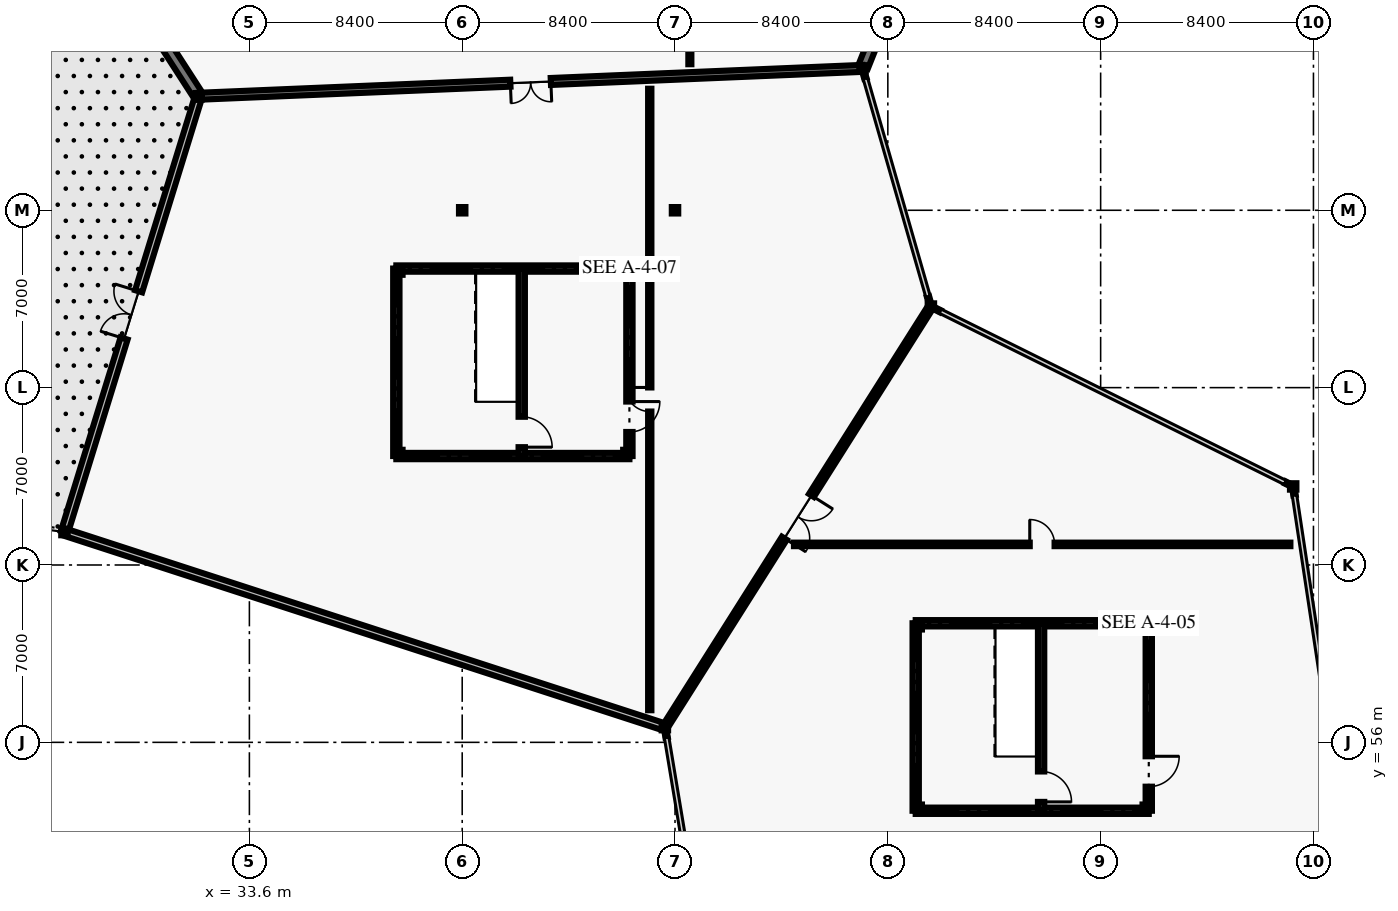
"""IFC4 building model, lengths in metres.
Left out: names, types, materials, properties, quantities, classifications, styles, units other than length and angle.
Written with IfcOpenShell. Run it as: python <this file> out.ifc"""

import sys

from ifc_helpers import new_model, si_unit, direction, frame, frame_2d, origin, origin_2d, place, context, subcontext, project, spatial, rectangle, i_section, extrude, element, fill, save


model = new_model("IFC4")
c1 = context("Model", 3, precision=1e-05, world=origin(), true_north=direction((0.0, 1.0)))
c2 = subcontext(c1, "Body", "Model", "MODEL_VIEW")
j1 = project(units=[si_unit("LENGTHUNIT", "METRE"), si_unit("PLANEANGLEUNIT", "RADIAN")], contexts=[c1])
p1 = place(None, origin())
s1 = spatial("IfcSite", under=j1, at=p1, CompositionType="ELEMENT")
p2 = place(p1, origin())
s2 = spatial("IfcBuilding", under=s1, at=p2, CompositionType="ELEMENT")
p3 = place(p2, frame((0.0, 0.0, 15.0)))
s3 = spatial("IfcBuildingStorey", under=s2, at=p3, CompositionType="ELEMENT", Elevation=15.0)
for number, where, z_axis, x_axis in (
    (1, (26.3, 64.3, 0.0), (0.0, 0.0, 1.0), (1.0, 0.0, 0.0)),
    (2, (31.6, 81.5, 0.0), (0.0, 0.0, 1.0), (1.0, 0.0, 0.0)),
    (3, (50.0, 56.6, 0.0), (0.0, 0.0, 1.0), (1.0, 0.0, 0.0)),
    (4, (57.8, 82.6, 0.0), (0.0, 0.0, 1.0), (1.0, 0.0, 0.0)),
    (5, (60.5, 73.2, 0.0), (0.0, 0.0, 1.0), (1.0, 0.0, 0.0)),
    (6, (74.8, 66.1, 0.0), (0.0, 0.0, 1.0), (1.0, 0.0, 0.0)),
    (7, (42.0, 77.0, 0.0), (0.0, 0.0, 1.0), (1.0, 0.0, 0.0)),
    (8, (50.4, 77.0, 0.0), (0.0, 0.0, 1.0), (1.0, 0.0, 0.0)),
    (9, (60.02, 53.42, 0.0), (0.0, 0.0, 1.0), (1.0, 0.0, 0.0)),
    (10, (68.98, 53.42, 0.0), (0.0, 0.0, 1.0), (1.0, 0.0, 0.0)),
    (11, (68.98, 60.58, 0.0), (0.0, 0.0, 1.0), (1.0, 0.0, 0.0)),
    (12, (60.02, 60.58, 0.0), (0.0, 0.0, 1.0), (1.0, 0.0, 0.0)),
    (13, (39.52, 67.42, 0.0), (0.0, 0.0, 1.0), (1.0, 0.0, 0.0)),
    (14, (48.48, 67.42, 0.0), (0.0, 0.0, 1.0), (1.0, 0.0, 0.0)),
    (15, (48.48, 74.58, 0.0), (0.0, 0.0, 1.0), (1.0, 0.0, 0.0)),
    (16, (39.52, 74.58, 0.0), (0.0, 0.0, 1.0), (1.0, 0.0, 0.0)),
):
    element("IfcColumn", number, at=place(p3, frame(where, z_axis=z_axis, x_axis=x_axis)), inside=s3, PredefinedType="COLUMN", context=c2, shape_type="SweptSolid", body=[
        extrude(i_section(OverallWidth=0.254, OverallDepth=0.254, WebThickness=0.009, FlangeThickness=0.014, FilletRadius=0.013, at=origin_2d()), origin(), (0.0, 0.0, 1.0), 4.8),
    ])
p4 = place(p3, frame((50.068, 56.196, 0.0), z_axis=(0.0, 0.0, 1.0), x_axis=(-0.165554954509, 0.986200566334, 0.0)))
e17 = element("IfcWall", 17, at=p4, inside=s3, PredefinedType="SOLIDWALL", context=c2, shape_type="SweptSolid", body=[
    extrude(rectangle(XDim=0.308, YDim=0.095, at=frame_2d((0.154, 0.0))), origin(), (0.0, 0.0, 1.0), 3.62),
])
p5 = place(p3, frame((74.806, 66.058, 0.0), z_axis=(0.0, 0.0, 1.0), x_axis=(0.14996991646, -0.988690560366, 0.0)))
e18 = element("IfcWall", 18, at=p5, inside=s3, PredefinedType="SOLIDWALL", context=c2, shape_type="SweptSolid", body=[
    extrude(rectangle(XDim=0.308, YDim=0.095, at=frame_2d((0.154, 0.0))), origin(), (0.0, 0.0, 1.0), 3.62),
])
for number, where, z_axis, x_axis in (
    (19, (60.592, 73.154, 0.0), (0.0, 0.0, 1.0), (0.895, -0.446, 0.0)),
    (20, (74.487, 66.256, 0.0), (0.0, 0.0, 1.0), (0.895, -0.447, 0.0)),
):
    element("IfcWall", number, at=place(p3, frame(where, z_axis=z_axis, x_axis=x_axis)), inside=s3, PredefinedType="SOLIDWALL", context=c2, shape_type="SweptSolid", body=[
        extrude(rectangle(XDim=0.307, YDim=0.095, at=frame_2d((0.154, 0.0))), origin(), (0.0, 0.0, 1.0), 3.62),
    ])
for number, where, z_axis, x_axis in (
    (21, (57.829, 82.502, 0.0), (0.0, 0.0, 1.0), (0.276, -0.961, 0.0)),
    (22, (60.386, 73.594, 0.0), (0.0, 0.0, 1.0), (0.276, -0.961, 0.0)),
):
    element("IfcWall", number, at=place(p3, frame(where, z_axis=z_axis, x_axis=x_axis)), inside=s3, PredefinedType="SOLIDWALL", context=c2, shape_type="SweptSolid", body=[
        extrude(rectangle(XDim=0.308, YDim=0.095, at=frame_2d((0.154, 0.0))), origin(), (0.0, 0.0, 1.0), 3.62),
    ])
p6 = place(p3, frame((26.3, 64.3, 0.0), z_axis=(0.0, 0.0, 1.0), x_axis=(0.294452119874, 0.955666233108, 0.0)))
e23 = element("IfcWall", 23, at=p6, inside=s3, PredefinedType="SOLIDWALL", context=c2, shape_type="SweptSolid", body=[
    extrude(rectangle(XDim=17.938, YDim=0.29, at=frame_2d((8.969, 0.0))), origin(), (0.0, 0.0, 1.0), 3.62),
])
p7 = place(p6, frame((7.994, 0.0, 0.0)))
e24 = element("IfcOpeningElement", 24, at=p7, cuts=e23, PredefinedType="OPENING", context=c2, shape_type="SweptSolid", body=[
    extrude(rectangle(XDim=1.95, YDim=2.3, at=frame_2d((0.975, 1.15))), frame((0.0, 0.155, 0.0), z_axis=(0.0, -1.0, 0.0), x_axis=(1.0, 0.0, 0.0)), (0.0, 0.0, 1.0), 0.31),
])
p8 = place(p3, frame((49.943, 56.619, 0.0), z_axis=(0.0, 0.0, 1.0), x_axis=(-0.951067694824, 0.308982588283, 0.0)))
e25 = element("IfcWall", 25, at=p8, inside=s3, PredefinedType="SOLIDWALL", context=c2, shape_type="SweptSolid", body=[
    extrude(rectangle(XDim=24.86, YDim=0.29, at=frame_2d((12.43, 0.0))), origin(), (0.0, 0.0, 1.0), 3.62),
])
p9 = place(p3, frame((62.4, 94.1, 0.0), z_axis=(0.0, 0.0, 1.0), x_axis=(-0.371407751599, -0.928469860605, 0.0)))
e26 = element("IfcWall", 26, at=p9, inside=s3, PredefinedType="SOLIDWALL", context=c2, shape_type="SweptSolid", body=[
    extrude(rectangle(XDim=12.326, YDim=0.4, at=frame_2d((6.163, 0.0))), origin(), (0.0, 0.0, 1.0), 3.62),
])
p10 = place(p3, frame((31.567, 81.55, 0.0), z_axis=(0.0, 0.0, 1.0), x_axis=(-0.542653962992, 0.839956353895, 0.0)))
e27 = element("IfcWall", 27, at=p10, inside=s3, PredefinedType="SOLIDWALL", context=c2, shape_type="SweptSolid", body=[
    extrude(rectangle(XDim=7.679, YDim=0.4, at=frame_2d((3.839, 0.0))), origin(), (0.0, 0.0, 1.0), 3.62),
])
p11 = place(p3, frame((60.5, 73.2, 0.0), z_axis=(0.0, 0.0, 1.0), x_axis=(-0.534570878454, -0.845123645338, 0.0)))
e28 = element("IfcWall", 28, at=p11, inside=s3, PredefinedType="SOLIDWALL", context=c2, shape_type="SweptSolid", body=[
    extrude(rectangle(XDim=19.642, YDim=0.225, at=frame_2d((9.821, 0.0))), origin(), (0.0, 0.0, 1.0), 4.02),
])
p12 = place(p11, frame((8.821, 0.0, 0.0)))
e29 = element("IfcOpeningElement", 29, at=p12, cuts=e28, PredefinedType="OPENING", context=c2, shape_type="SweptSolid", body=[
    extrude(rectangle(XDim=2.0, YDim=2.5, at=frame_2d((1.0, 1.25))), frame((0.0, 0.123, 0.0), z_axis=(0.0, -1.0, 0.0), x_axis=(1.0, 0.0, 0.0)), (0.0, 0.0, 1.0), 0.245),
])
p13 = place(p3, frame((57.8, 82.6, 0.0), z_axis=(0.0, 0.0, 1.0), x_axis=(-0.999119645224, -0.041951573605, 0.0)))
e30 = element("IfcWall", 30, at=p13, inside=s3, PredefinedType="SOLIDWALL", context=c2, shape_type="SweptSolid", body=[
    extrude(rectangle(XDim=26.223, YDim=0.275, at=frame_2d((13.112, 0.0))), origin(), (0.0, 0.0, 1.0), 4.02),
])
p14 = place(p13, frame((12.312, 0.0, 0.0)))
e31 = element("IfcOpeningElement", 31, at=p14, cuts=e30, PredefinedType="OPENING", context=c2, shape_type="SweptSolid", body=[
    extrude(rectangle(XDim=1.6, YDim=2.45, at=frame_2d((0.8, 1.225))), frame((0.0, 0.147, 0.0), z_axis=(0.0, -1.0, 0.0), x_axis=(1.0, 0.0, 0.0)), (0.0, 0.0, 1.0), 0.295),
])
p15 = place(p3, frame((55.095, 63.813, 0.0), z_axis=(0.0, 0.0, 1.0), x_axis=(1.0, 0.0, 0.0)))
e32 = element("IfcWall", 32, at=p15, inside=s3, PredefinedType="PARTITIONING", context=c2, shape_type="SweptSolid", body=[
    extrude(rectangle(XDim=19.595, YDim=0.14, at=frame_2d((9.797, 0.0))), origin(), (0.0, 0.0, 1.0), 3.32),
])
p16 = place(p15, frame((9.307, 0.0, 0.0)))
e33 = element("IfcOpeningElement", 33, at=p16, cuts=e32, PredefinedType="OPENING", context=c2, shape_type="SweptSolid", body=[
    extrude(rectangle(XDim=0.98, YDim=2.15, at=frame_2d((0.49, 1.075))), frame((0.0, 0.08, 0.0), z_axis=(0.0, -1.0, 0.0), x_axis=(1.0, 0.0, 0.0)), (0.0, 0.0, 1.0), 0.16),
])
p17 = place(p3, frame((49.403, 57.267, 0.0), z_axis=(0.0, 0.0, 1.0), x_axis=(0.0, 1.0, 0.0)))
e34 = element("IfcWall", 34, at=p17, inside=s3, PredefinedType="PARTITIONING", context=c2, shape_type="SweptSolid", body=[
    extrude(rectangle(XDim=24.53, YDim=0.13, at=frame_2d((12.265, 0.0))), origin(), (0.0, 0.0, 1.0), 3.32),
])
p18 = place(p17, frame((11.79, 0.0, 0.0)))
e35 = element("IfcOpeningElement", 35, at=p18, cuts=e34, PredefinedType="OPENING", context=c2, shape_type="SweptSolid", body=[
    extrude(rectangle(XDim=0.95, YDim=2.15, at=frame_2d((0.475, 1.075))), frame((0.0, 0.075, 0.0), z_axis=(0.0, -1.0, 0.0), x_axis=(1.0, 0.0, 0.0)), (0.0, 0.0, 1.0), 0.15),
])
p19 = place(p3, frame((50.986, 82.764, 0.0), z_axis=(0.0, 0.0, 1.0), x_axis=(0.0, 1.0, 0.0)))
e36 = element("IfcWall", 36, at=p19, inside=s3, PredefinedType="PARTITIONING", context=c2, shape_type="SweptSolid", body=[
    extrude(rectangle(XDim=5.136, YDim=0.12, at=frame_2d((2.568, 0.0))), origin(), (0.0, 0.0, 1.0), 3.32),
])
p20 = place(p19, frame((2.078, 0.0, 0.0)))
e37 = element("IfcOpeningElement", 37, at=p20, cuts=e36, PredefinedType="OPENING", context=c2, shape_type="SweptSolid", body=[
    extrude(rectangle(XDim=0.98, YDim=2.15, at=frame_2d((0.49, 1.075))), frame((0.0, 0.07, 0.0), z_axis=(0.0, -1.0, 0.0), x_axis=(1.0, 0.0, 0.0)), (0.0, 0.0, 1.0), 0.14),
])
p21 = place(p3, frame((59.9, 53.3, 0.0), z_axis=(0.0, 0.0, 1.0), x_axis=(0.0, 1.0, 0.0)))
e38 = element("IfcWall", 38, at=p21, inside=s3, PredefinedType="SHEAR", context=c2, shape_type="SweptSolid", body=[
    extrude(rectangle(XDim=7.4, YDim=0.25, at=frame_2d((3.7, 0.0))), origin(), (0.0, 0.0, 1.0), 4.56),
])
for number, where, z_axis, x_axis in (
    (39, (59.9, 60.7, 0.0), (0.0, 0.0, 1.0), (1.0, 0.0, 0.0)),
    (40, (69.1, 53.3, 0.0), (0.0, 0.0, 1.0), (-1.0, 0.0, 0.0)),
):
    element("IfcWall", number, at=place(p3, frame(where, z_axis=z_axis, x_axis=x_axis)), inside=s3, PredefinedType="SHEAR", context=c2, shape_type="SweptSolid", body=[
        extrude(rectangle(XDim=9.2, YDim=0.25, at=frame_2d((4.6, 0.0))), origin(), (0.0, 0.0, 1.0), 4.56),
    ])
p22 = place(p3, frame((69.1, 60.7, 0.0), z_axis=(0.0, 0.0, 1.0), x_axis=(0.0, -1.0, 0.0)))
e41 = element("IfcWall", 41, at=p22, inside=s3, PredefinedType="SHEAR", context=c2, shape_type="SweptSolid", body=[
    extrude(rectangle(XDim=7.4, YDim=0.25, at=frame_2d((3.7, 0.0))), origin(), (0.0, 0.0, 1.0), 4.56),
])
p23 = place(p22, frame((5.25, 0.0, 0.0)))
e42 = element("IfcOpeningElement", 42, at=p23, cuts=e41, PredefinedType="OPENING", context=c2, shape_type="SweptSolid", body=[
    extrude(rectangle(XDim=1.2, YDim=2.2, at=frame_2d((0.6, 1.1))), frame((0.0, 0.135, 0.0), z_axis=(0.0, -1.0, 0.0), x_axis=(1.0, 0.0, 0.0)), (0.0, 0.0, 1.0), 0.27),
])
p24 = place(p3, frame((64.85, 60.7, 0.0), z_axis=(0.0, 0.0, 1.0), x_axis=(0.0, -1.0, 0.0)))
e43 = element("IfcWall", 43, at=p24, inside=s3, PredefinedType="SHEAR", context=c2, shape_type="SweptSolid", body=[
    extrude(rectangle(XDim=7.4, YDim=0.25, at=frame_2d((3.7, 0.0))), origin(), (0.0, 0.0, 1.0), 4.56),
])
p25 = place(p24, frame((5.85, 0.0, 0.0)))
e44 = element("IfcOpeningElement", 44, at=p25, cuts=e43, PredefinedType="OPENING", context=c2, shape_type="SweptSolid", body=[
    extrude(rectangle(XDim=1.2, YDim=2.2, at=frame_2d((0.6, 1.1))), frame((0.0, 0.135, 0.0), z_axis=(0.0, -1.0, 0.0), x_axis=(1.0, 0.0, 0.0)), (0.0, 0.0, 1.0), 0.27),
])
p26 = place(p3, frame((39.4, 67.3, 0.0), z_axis=(0.0, 0.0, 1.0), x_axis=(0.0, 1.0, 0.0)))
e45 = element("IfcWall", 45, at=p26, inside=s3, PredefinedType="SHEAR", context=c2, shape_type="SweptSolid", body=[
    extrude(rectangle(XDim=7.4, YDim=0.25, at=frame_2d((3.7, 0.0))), origin(), (0.0, 0.0, 1.0), 4.56),
])
for number, where, z_axis, x_axis in (
    (46, (39.4, 74.7, 0.0), (0.0, 0.0, 1.0), (1.0, 0.0, 0.0)),
    (47, (48.6, 67.3, 0.0), (0.0, 0.0, 1.0), (-1.0, 0.0, 0.0)),
):
    element("IfcWall", number, at=place(p3, frame(where, z_axis=z_axis, x_axis=x_axis)), inside=s3, PredefinedType="SHEAR", context=c2, shape_type="SweptSolid", body=[
        extrude(rectangle(XDim=9.2, YDim=0.25, at=frame_2d((4.6, 0.0))), origin(), (0.0, 0.0, 1.0), 4.56),
    ])
p27 = place(p3, frame((48.6, 74.7, 0.0), z_axis=(0.0, 0.0, 1.0), x_axis=(0.0, -1.0, 0.0)))
e48 = element("IfcWall", 48, at=p27, inside=s3, PredefinedType="SHEAR", context=c2, shape_type="SweptSolid", body=[
    extrude(rectangle(XDim=7.4, YDim=0.25, at=frame_2d((3.7, 0.0))), origin(), (0.0, 0.0, 1.0), 4.56),
])
p28 = place(p27, frame((5.25, 0.0, 0.0)))
e49 = element("IfcOpeningElement", 49, at=p28, cuts=e48, PredefinedType="OPENING", context=c2, shape_type="SweptSolid", body=[
    extrude(rectangle(XDim=1.2, YDim=2.2, at=frame_2d((0.6, 1.1))), frame((0.0, 0.135, 0.0), z_axis=(0.0, -1.0, 0.0), x_axis=(1.0, 0.0, 0.0)), (0.0, 0.0, 1.0), 0.27),
])
p29 = place(p3, frame((44.35, 74.7, 0.0), z_axis=(0.0, 0.0, 1.0), x_axis=(0.0, -1.0, 0.0)))
e50 = element("IfcWall", 50, at=p29, inside=s3, PredefinedType="SHEAR", context=c2, shape_type="SweptSolid", body=[
    extrude(rectangle(XDim=7.4, YDim=0.25, at=frame_2d((3.7, 0.0))), origin(), (0.0, 0.0, 1.0), 4.56),
])
p30 = place(p29, frame((5.85, 0.0, 0.0)))
e51 = element("IfcOpeningElement", 51, at=p30, cuts=e50, PredefinedType="OPENING", context=c2, shape_type="SweptSolid", body=[
    extrude(rectangle(XDim=1.2, YDim=2.2, at=frame_2d((0.6, 1.1))), frame((0.0, 0.135, 0.0), z_axis=(0.0, -1.0, 0.0), x_axis=(1.0, 0.0, 0.0)), (0.0, 0.0, 1.0), 0.27),
])
p31 = place(p7, origin())
e52 = element("IfcDoor", 52, at=p31, inside=s3, OperationType="DOUBLE_DOOR_SINGLE_SWING", PredefinedType="DOOR", context=c2, shape_type="SweptSolid", body=[
    extrude(rectangle(XDim=1.95, YDim=2.3, at=frame_2d((0.975, 1.15))), frame((0.0, 0.025, 0.0), z_axis=(0.0, -1.0, 0.0), x_axis=(1.0, 0.0, 0.0)), (0.0, 0.0, 1.0), 0.05),
])
fill(e24, e52)
p32 = place(p12, origin())
e53 = element("IfcDoor", 53, at=p32, inside=s3, OperationType="DOUBLE_DOOR_SINGLE_SWING", PredefinedType="DOOR", context=c2, shape_type="SweptSolid", body=[
    extrude(rectangle(XDim=2.0, YDim=2.5, at=frame_2d((1.0, 1.25))), frame((0.0, 0.025, 0.0), z_axis=(0.0, -1.0, 0.0), x_axis=(1.0, 0.0, 0.0)), (0.0, 0.0, 1.0), 0.05),
])
fill(e29, e53)
p33 = place(p14, origin())
e54 = element("IfcDoor", 54, at=p33, inside=s3, OperationType="DOUBLE_DOOR_SINGLE_SWING", PredefinedType="DOOR", context=c2, shape_type="SweptSolid", body=[
    extrude(rectangle(XDim=1.6, YDim=2.45, at=frame_2d((0.8, 1.225))), frame((0.0, 0.025, 0.0), z_axis=(0.0, -1.0, 0.0), x_axis=(1.0, 0.0, 0.0)), (0.0, 0.0, 1.0), 0.05),
])
fill(e31, e54)
p34 = place(p16, origin())
e55 = element("IfcDoor", 55, at=p34, inside=s3, OperationType="SINGLE_SWING_LEFT", PredefinedType="DOOR", context=c2, shape_type="SweptSolid", body=[
    extrude(rectangle(XDim=0.98, YDim=2.15, at=frame_2d((0.49, 1.075))), frame((0.0, 0.025, 0.0), z_axis=(0.0, -1.0, 0.0), x_axis=(1.0, 0.0, 0.0)), (0.0, 0.0, 1.0), 0.05),
])
fill(e33, e55)
p35 = place(p18, origin())
e56 = element("IfcDoor", 56, at=p35, inside=s3, OperationType="SINGLE_SWING_RIGHT", PredefinedType="DOOR", context=c2, shape_type="SweptSolid", body=[
    extrude(rectangle(XDim=0.95, YDim=2.15, at=frame_2d((0.475, 1.075))), frame((0.0, 0.025, 0.0), z_axis=(0.0, -1.0, 0.0), x_axis=(1.0, 0.0, 0.0)), (0.0, 0.0, 1.0), 0.05),
])
fill(e35, e56)
p36 = place(p23, origin())
e57 = element("IfcDoor", 57, at=p36, inside=s3, OperationType="SINGLE_SWING_LEFT", PredefinedType="DOOR", context=c2, shape_type="SweptSolid", body=[
    extrude(rectangle(XDim=1.2, YDim=2.2, at=frame_2d((0.6, 1.1))), frame((0.0, 0.025, 0.0), z_axis=(0.0, -1.0, 0.0), x_axis=(1.0, 0.0, 0.0)), (0.0, 0.0, 1.0), 0.05),
])
fill(e42, e57)
p37 = place(p25, origin())
e58 = element("IfcDoor", 58, at=p37, inside=s3, OperationType="SINGLE_SWING_RIGHT", PredefinedType="DOOR", context=c2, shape_type="SweptSolid", body=[
    extrude(rectangle(XDim=1.2, YDim=2.2, at=frame_2d((0.6, 1.1))), frame((0.0, 0.025, 0.0), z_axis=(0.0, -1.0, 0.0), x_axis=(1.0, 0.0, 0.0)), (0.0, 0.0, 1.0), 0.05),
])
fill(e44, e58)
p38 = place(p28, origin())
e59 = element("IfcDoor", 59, at=p38, inside=s3, OperationType="SINGLE_SWING_LEFT", PredefinedType="DOOR", context=c2, shape_type="SweptSolid", body=[
    extrude(rectangle(XDim=1.2, YDim=2.2, at=frame_2d((0.6, 1.1))), frame((0.0, 0.025, 0.0), z_axis=(0.0, -1.0, 0.0), x_axis=(1.0, 0.0, 0.0)), (0.0, 0.0, 1.0), 0.05),
])
fill(e49, e59)
p39 = place(p30, origin())
e60 = element("IfcDoor", 60, at=p39, inside=s3, OperationType="SINGLE_SWING_RIGHT", PredefinedType="DOOR", context=c2, shape_type="SweptSolid", body=[
    extrude(rectangle(XDim=1.2, YDim=2.2, at=frame_2d((0.6, 1.1))), frame((0.0, 0.025, 0.0), z_axis=(0.0, -1.0, 0.0), x_axis=(1.0, 0.0, 0.0)), (0.0, 0.0, 1.0), 0.05),
])
fill(e51, e60)
save(model, sys.argv[1])
